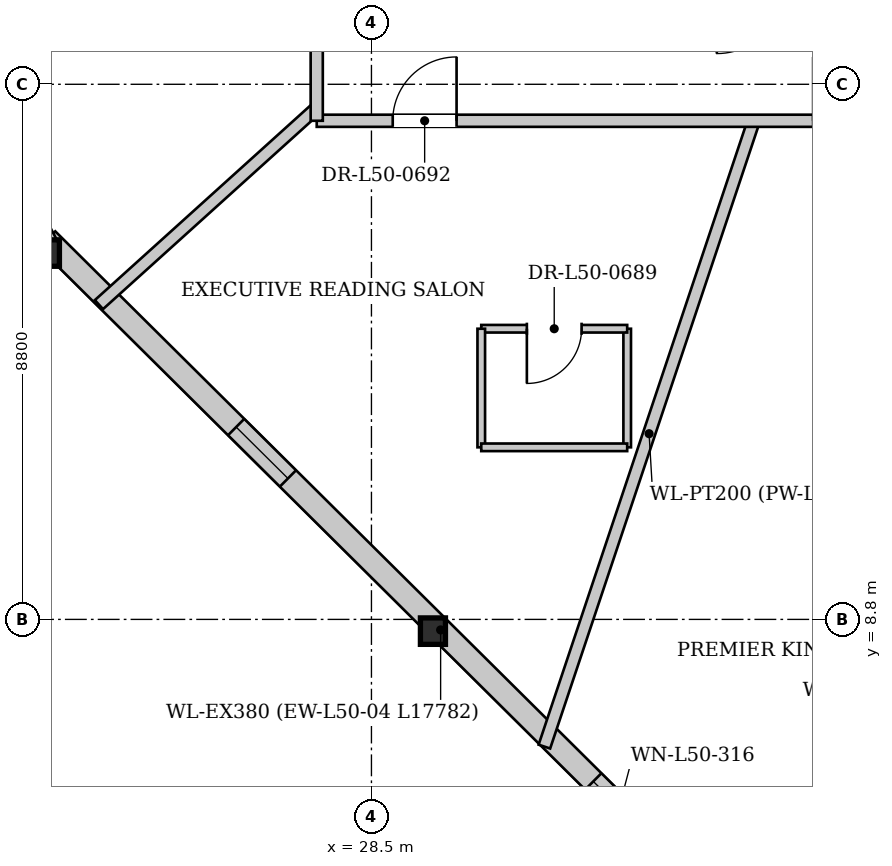
"""IFC4 building model, lengths in metres.
Left out: names, types, materials, properties, quantities, classifications, styles, units other than length and angle.
Written with IfcOpenShell. Run it as: python <this file> out.ifc"""

import sys

from ifc_helpers import new_model, si_unit, direction, frame, frame_2d, origin, origin_2d, place, context, subcontext, project, spatial, rectangle, i_section, extrude, source, transform, mapped, element, fill, save


model = new_model("IFC4")
c1 = context("Model", 3, precision=1e-05, world=origin(), true_north=direction((0.0, 1.0)))
c2 = subcontext(c1, "Body", "Model", "MODEL_VIEW")
j1 = project(units=[si_unit("LENGTHUNIT", "METRE"), si_unit("PLANEANGLEUNIT", "RADIAN")], contexts=[c1])
p1 = place(None, origin())
s1 = spatial("IfcSite", under=j1, at=p1, CompositionType="ELEMENT")
p2 = place(p1, origin())
s2 = spatial("IfcBuilding", under=s1, at=p2, CompositionType="ELEMENT")
p3 = place(p2, frame((0.0, 0.0, 189.2)))
s3 = spatial("IfcBuildingStorey", under=s2, at=p3, CompositionType="ELEMENT", Elevation=189.2)
m1 = source(origin(), c2, "Body", "SweptSolid", [
    extrude(i_section(OverallWidth=0.412, OverallDepth=0.435, WebThickness=0.031, FlangeThickness=0.05, at=origin_2d()), origin(), (0.0, 0.0, 1.0), 3.399),
])
p4 = place(p3, frame((23.033, 14.912, 0.0), z_axis=(0.076270435651, -0.051565134461, 0.99575290989), x_axis=(0.560088984388, 0.828432453231, 0.0)))
e1 = element("IfcColumn", 1, at=p4, inside=s3, PredefinedType="COLUMN", context=c2, shape_type="MappedRepresentation", body=[
    mapped(m1, transform((0.0, 0.0, 0.0), x_axis=(1.0, 0.0, 0.0), y_axis=(0.0, 1.0, 0.0), z_axis=(0.0, 0.0, 1.0), scale=1.0)),
])
m2 = source(origin(), c2, "Body", "SweptSolid", [
    extrude(i_section(OverallWidth=0.412, OverallDepth=0.435, WebThickness=0.031, FlangeThickness=0.05, at=origin_2d()), origin(), (0.0, 0.0, 1.0), 3.403),
])
p5 = place(p3, frame((29.344, 8.65, 0.0), z_axis=(0.098157072881, -0.025472047422, 0.994844894365), x_axis=(0.251183150489, 0.967939577097, 0.0)))
e2 = element("IfcColumn", 2, at=p5, inside=s3, PredefinedType="COLUMN", context=c2, shape_type="MappedRepresentation", body=[
    mapped(m2, transform((0.0, 0.0, 0.0), x_axis=(1.0, 0.0, 0.0), y_axis=(0.0, 1.0, 0.0), z_axis=(0.0, 0.0, 1.0), scale=1.0)),
])
p6 = place(p3, frame((35.79, 2.523, 0.0), z_axis=(0.0, 0.0, 1.0), x_axis=(-0.709902124229, 0.704300343614, 0.0)))
e3 = element("IfcWall", 3, at=p6, inside=s3, PredefinedType="SOLIDWALL", context=c2, shape_type="SweptSolid", body=[
    extrude(rectangle(XDim=17.782, YDim=0.38, at=frame_2d((8.891, 0.0))), origin(), (0.0, 0.0, 1.0), 2.722),
])
p7 = place(p6, frame((3.929, 0.0, 0.65)))
e4 = element("IfcOpeningElement", 4, at=p7, cuts=e3, PredefinedType="OPENING", context=c2, shape_type="SweptSolid", body=[
    extrude(rectangle(XDim=1.2, YDim=1.5, at=frame_2d((0.6, 0.75))), frame((0.0, 0.2, 0.0), z_axis=(0.0, -1.0, 0.0), x_axis=(1.0, 0.0, 0.0)), (0.0, 0.0, 1.0), 0.4),
])
p8 = place(p6, frame((12.203, 0.0, 0.65)))
e5 = element("IfcOpeningElement", 5, at=p8, cuts=e3, PredefinedType="OPENING", context=c2, shape_type="SweptSolid", body=[
    extrude(rectangle(XDim=1.2, YDim=1.5, at=frame_2d((0.6, 0.75))), frame((0.0, 0.2, 0.0), z_axis=(0.0, -1.0, 0.0), x_axis=(1.0, 0.0, 0.0)), (0.0, 0.0, 1.0), 0.4),
])
p9 = place(p3, frame((23.174, 14.987, 0.0), z_axis=(0.0, 0.0, 1.0), x_axis=(-0.467564707415, 0.883958847673, 0.0)))
e6 = element("IfcWall", 6, at=p9, inside=s3, PredefinedType="SOLIDWALL", context=c2, shape_type="SweptSolid", body=[
    extrude(rectangle(XDim=17.782, YDim=0.32, at=frame_2d((8.891, 0.0))), origin(), (0.0, 0.0, 1.0), 2.722),
])
p10 = place(p9, frame((4.94, 0.0, 0.0)))
e7 = element("IfcOpeningElement", 7, at=p10, cuts=e6, PredefinedType="OPENING", context=c2, shape_type="SweptSolid", body=[
    extrude(rectangle(XDim=1.5, YDim=2.3, at=frame_2d((0.75, 1.15))), frame((0.0, 0.17, 0.0), z_axis=(0.0, -1.0, 0.0), x_axis=(1.0, 0.0, 0.0)), (0.0, 0.0, 1.0), 0.34),
])
p11 = place(p9, frame((12.309, 0.0, 0.252)))
e8 = element("IfcOpeningElement", 8, at=p11, cuts=e6, PredefinedType="OPENING", context=c2, shape_type="SweptSolid", body=[
    extrude(rectangle(XDim=2.6, YDim=2.35, at=frame_2d((1.3, 1.175))), frame((0.0, 0.17, 0.0), z_axis=(0.0, -1.0, 0.0), x_axis=(1.0, 0.0, 0.0)), (0.0, 0.0, 1.0), 0.34),
])
p12 = place(p3, frame((34.788, 17.0, 0.0), z_axis=(0.0, 0.0, 1.0), x_axis=(-0.317307373574, -0.94832274605, 0.0)))
e9 = element("IfcWall", 9, at=p12, inside=s3, PredefinedType="PARTITIONING", context=c2, shape_type="SweptSolid", body=[
    extrude(rectangle(XDim=10.853, YDim=0.2, at=frame_2d((5.426, 0.0))), origin(), (0.0, 0.0, 1.0), 3.33),
])
p13 = place(p3, frame((27.6, 17.21, 0.0), z_axis=(0.0, 0.0, 1.0), x_axis=(-0.742259303299, -0.670112771603, 0.0)))
e10 = element("IfcWall", 10, at=p13, inside=s3, PredefinedType="PARTITIONING", context=c2, shape_type="SweptSolid", body=[
    extrude(rectangle(XDim=4.825, YDim=0.2, at=frame_2d((2.413, 0.0))), origin(), (0.0, 0.0, 1.0), 3.33),
])
p14 = place(p3, frame((32.706, 11.63, 0.0), z_axis=(0.0, 0.0, 1.0), x_axis=(0.0, 1.0, 0.0)))
e11 = element("IfcWall", 11, at=p14, inside=s3, PredefinedType="PARTITIONING", context=c2, shape_type="SweptSolid", body=[
    extrude(rectangle(XDim=1.95, YDim=0.125, at=frame_2d((0.975, 0.0))), origin(), (0.0, 0.0, 1.0), 3.33),
])
p15 = place(p3, frame((32.706, 13.58, 0.0), z_axis=(0.0, 0.0, 1.0), x_axis=(-1.0, 0.0, 0.0)))
e12 = element("IfcWall", 12, at=p15, inside=s3, PredefinedType="PARTITIONING", context=c2, shape_type="SweptSolid", body=[
    extrude(rectangle(XDim=2.4, YDim=0.125, at=frame_2d((1.2, 0.0))), origin(), (0.0, 0.0, 1.0), 3.33),
])
p16 = place(p15, frame((0.75, 0.0, 0.0)))
e13 = element("IfcOpeningElement", 13, at=p16, cuts=e12, PredefinedType="OPENING", context=c2, shape_type="SweptSolid", body=[
    extrude(rectangle(XDim=0.9, YDim=2.1, at=frame_2d((0.45, 1.05))), frame((0.0, 0.073, 0.0), z_axis=(0.0, -1.0, 0.0), x_axis=(1.0, 0.0, 0.0)), (0.0, 0.0, 1.0), 0.145),
])
p17 = place(p3, frame((30.306, 13.58, 0.0), z_axis=(0.0, 0.0, 1.0), x_axis=(0.0, -1.0, 0.0)))
e14 = element("IfcWall", 14, at=p17, inside=s3, PredefinedType="PARTITIONING", context=c2, shape_type="SweptSolid", body=[
    extrude(rectangle(XDim=1.95, YDim=0.125, at=frame_2d((0.975, 0.0))), origin(), (0.0, 0.0, 1.0), 3.33),
])
p18 = place(p3, frame((30.306, 11.63, 0.0), z_axis=(0.0, 0.0, 1.0), x_axis=(1.0, 0.0, 0.0)))
e15 = element("IfcWall", 15, at=p18, inside=s3, PredefinedType="PARTITIONING", context=c2, shape_type="SweptSolid", body=[
    extrude(rectangle(XDim=2.4, YDim=0.125, at=frame_2d((1.2, 0.0))), origin(), (0.0, 0.0, 1.0), 3.33),
])
p19 = place(p3, frame((27.6, 17.0, 0.0), z_axis=(0.0, 0.0, 1.0), x_axis=(1.0, 0.0, 0.0)))
e16 = element("IfcWall", 16, at=p19, inside=s3, PredefinedType="PARTITIONING", context=c2, shape_type="SweptSolid", body=[
    extrude(rectangle(XDim=20.8, YDim=0.2, at=frame_2d((10.4, 0.0))), origin(), (0.0, 0.0, 1.0), 3.33),
])
p20 = place(p19, frame((8.164, 0.0, 0.0)))
e17 = element("IfcOpeningElement", 17, at=p20, cuts=e16, PredefinedType="OPENING", context=c2, shape_type="SweptSolid", body=[
    extrude(rectangle(XDim=1.05, YDim=2.2, at=frame_2d((0.525, 1.1))), frame((0.0, 0.11, 0.0), z_axis=(0.0, -1.0, 0.0), x_axis=(1.0, 0.0, 0.0)), (0.0, 0.0, 1.0), 0.22),
])
p21 = place(p19, frame((15.317, 0.0, 0.0)))
e18 = element("IfcOpeningElement", 18, at=p21, cuts=e16, PredefinedType="OPENING", context=c2, shape_type="SweptSolid", body=[
    extrude(rectangle(XDim=1.05, YDim=2.2, at=frame_2d((0.525, 1.1))), frame((0.0, 0.11, 0.0), z_axis=(0.0, -1.0, 0.0), x_axis=(1.0, 0.0, 0.0)), (0.0, 0.0, 1.0), 0.22),
])
p22 = place(p19, frame((1.25, 0.0, 0.0)))
e19 = element("IfcOpeningElement", 19, at=p22, cuts=e16, PredefinedType="OPENING", context=c2, shape_type="SweptSolid", body=[
    extrude(rectangle(XDim=1.05, YDim=2.2, at=frame_2d((0.525, 1.1))), frame((0.0, 0.11, 0.0), z_axis=(0.0, -1.0, 0.0), x_axis=(1.0, 0.0, 0.0)), (0.0, 0.0, 1.0), 0.22),
])
p23 = place(p3, frame((27.6, 17.0, 0.0), z_axis=(0.0, 0.0, 1.0), x_axis=(0.0, 1.0, 0.0)))
e20 = element("IfcWall", 20, at=p23, inside=s3, PredefinedType="PARTITIONING", context=c2, shape_type="SweptSolid", body=[
    extrude(rectangle(XDim=19.2, YDim=0.2, at=frame_2d((9.6, 0.0))), origin(), (0.0, 0.0, 1.0), 3.33),
])
p24 = place(p23, frame((15.037, 0.0, 0.0)))
e21 = element("IfcOpeningElement", 21, at=p24, cuts=e20, PredefinedType="OPENING", context=c2, shape_type="SweptSolid", body=[
    extrude(rectangle(XDim=1.05, YDim=2.2, at=frame_2d((0.525, 1.1))), frame((0.0, 0.11, 0.0), z_axis=(0.0, -1.0, 0.0), x_axis=(1.0, 0.0, 0.0)), (0.0, 0.0, 1.0), 0.22),
])
p25 = place(p23, frame((3.635, 0.0, 0.0)))
e22 = element("IfcOpeningElement", 22, at=p25, cuts=e20, PredefinedType="OPENING", context=c2, shape_type="SweptSolid", body=[
    extrude(rectangle(XDim=1.05, YDim=2.2, at=frame_2d((0.525, 1.1))), frame((0.0, 0.11, 0.0), z_axis=(0.0, -1.0, 0.0), x_axis=(1.0, 0.0, 0.0)), (0.0, 0.0, 1.0), 0.22),
])
m3 = source(origin(), c2, "Body", "SweptSolid", [
    extrude(rectangle(XDim=1.2, YDim=1.5, at=frame_2d((0.6, 0.75))), frame((0.0, 0.03, 0.0), z_axis=(0.0, -1.0, 0.0), x_axis=(1.0, 0.0, 0.0)), (0.0, 0.0, 1.0), 0.06),
])
p26 = place(p7, origin())
e23 = element("IfcWindow", 23, at=p26, inside=s3, PartitioningType="SINGLE_PANEL", PredefinedType="WINDOW", context=c2, shape_type="MappedRepresentation", body=[
    mapped(m3, transform((0.0, 0.0, 0.0), x_axis=(1.0, 0.0, 0.0), y_axis=(0.0, 1.0, 0.0), z_axis=(0.0, 0.0, 1.0), scale=1.0)),
])
fill(e4, e23)
p27 = place(p8, origin())
e24 = element("IfcWindow", 24, at=p27, inside=s3, PartitioningType="SINGLE_PANEL", PredefinedType="WINDOW", context=c2, shape_type="MappedRepresentation", body=[
    mapped(m3, transform((0.0, 0.0, 0.0), x_axis=(1.0, 0.0, 0.0), y_axis=(0.0, 1.0, 0.0), z_axis=(0.0, 0.0, 1.0), scale=1.0)),
])
fill(e5, e24)
m4 = source(origin(), c2, "Body", "SweptSolid", [
    extrude(rectangle(XDim=0.9, YDim=2.1, at=frame_2d((0.45, 1.05))), frame((0.0, 0.025, 0.0), z_axis=(0.0, -1.0, 0.0), x_axis=(1.0, 0.0, 0.0)), (0.0, 0.0, 1.0), 0.05),
])
p28 = place(p16, origin())
e25 = element("IfcDoor", 25, at=p28, inside=s3, OperationType="SINGLE_SWING_RIGHT", PredefinedType="DOOR", context=c2, shape_type="MappedRepresentation", body=[
    mapped(m4, transform((0.0, 0.0, 0.0), x_axis=(1.0, 0.0, 0.0), y_axis=(0.0, 1.0, 0.0), z_axis=(0.0, 0.0, 1.0), scale=1.0)),
])
fill(e13, e25)
m5 = source(origin(), c2, "Body", "SweptSolid", [
    extrude(rectangle(XDim=1.05, YDim=2.2, at=frame_2d((0.525, 1.1))), frame((0.0, 0.025, 0.0), z_axis=(0.0, -1.0, 0.0), x_axis=(1.0, 0.0, 0.0)), (0.0, 0.0, 1.0), 0.05),
])
p29 = place(p22, origin())
e26 = element("IfcDoor", 26, at=p29, inside=s3, OperationType="SINGLE_SWING_RIGHT", PredefinedType="DOOR", context=c2, shape_type="MappedRepresentation", body=[
    mapped(m5, transform((0.0, 0.0, 0.0), x_axis=(1.0, 0.0, 0.0), y_axis=(0.0, 1.0, 0.0), z_axis=(0.0, 0.0, 1.0), scale=1.0)),
])
fill(e19, e26)
save(model, sys.argv[1])
